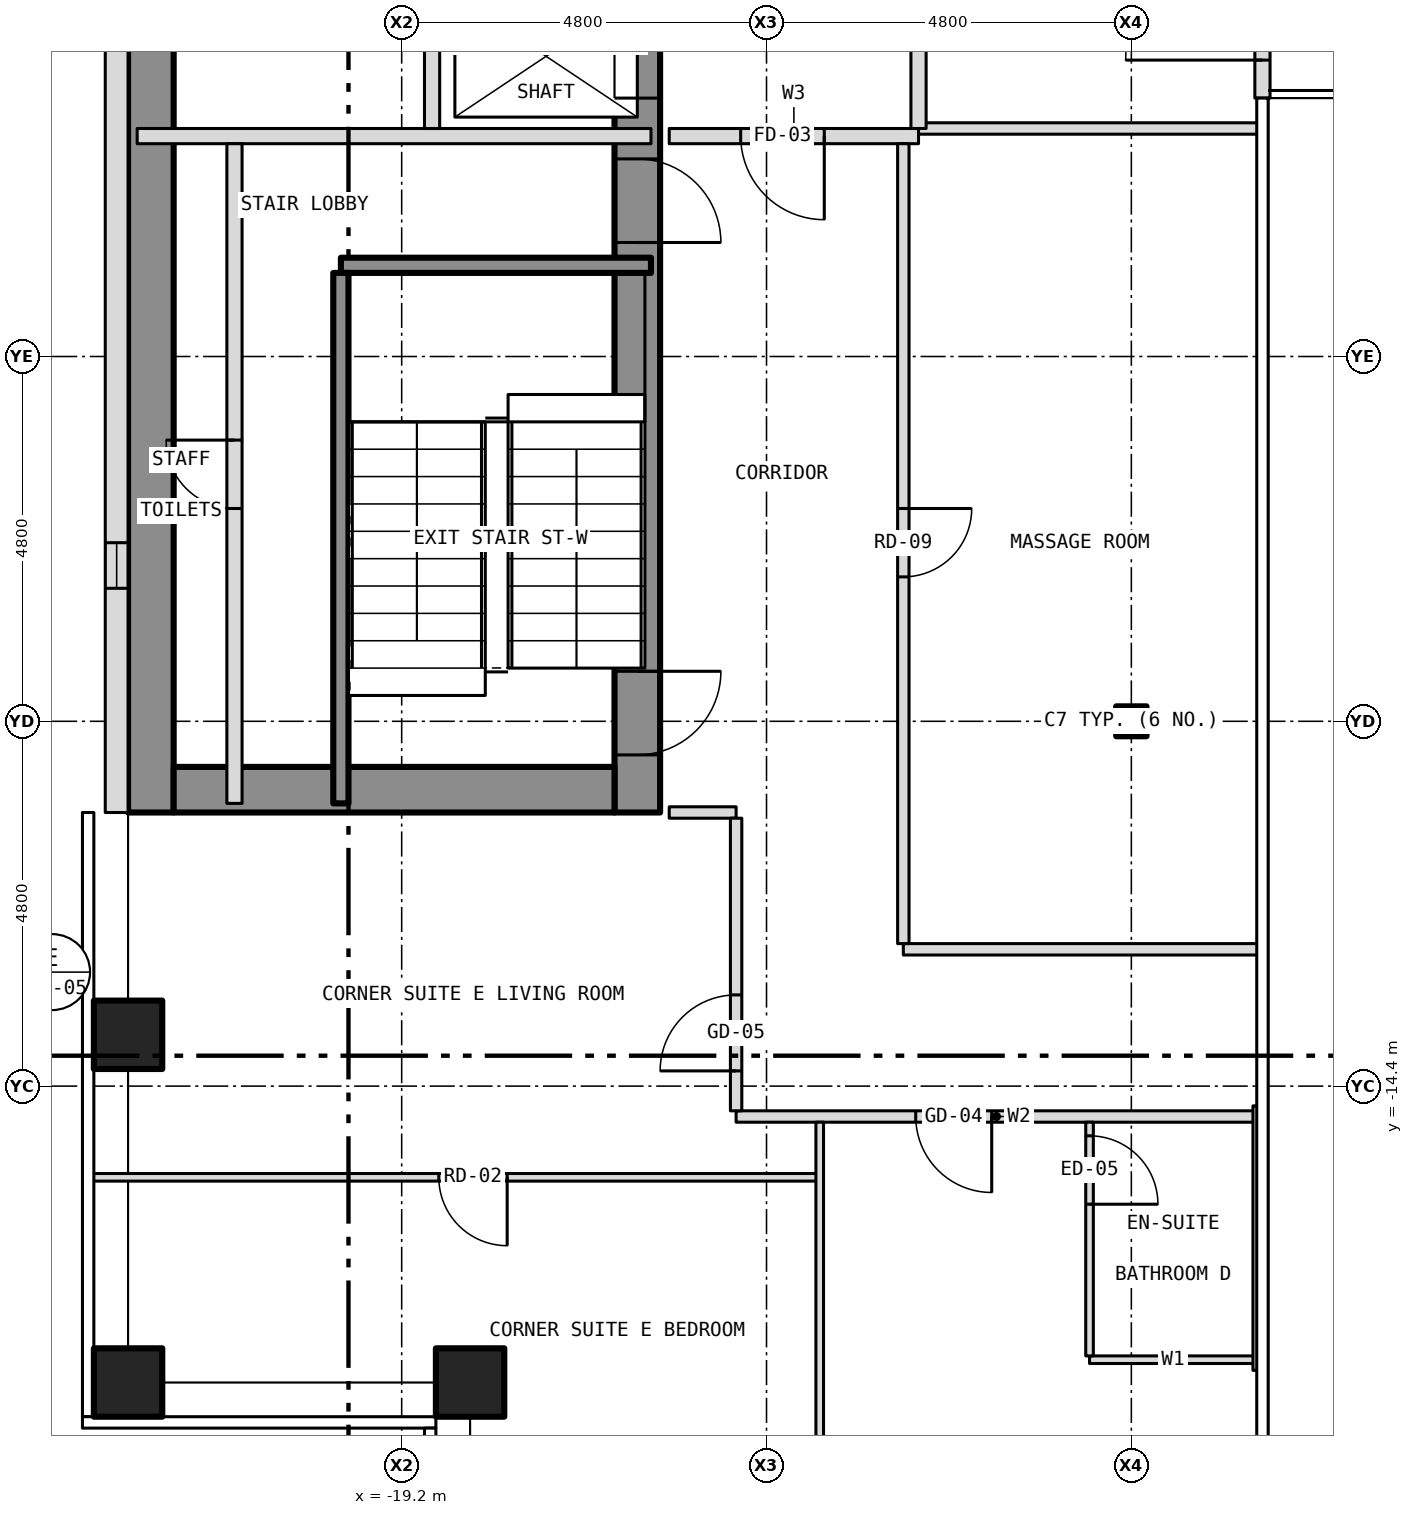
"""IFC4 building model, lengths in metres.
Left out: names, types, materials, properties, quantities, classifications, styles, units other than length and angle.
Written with IfcOpenShell. Run it as: python <this file> out.ifc"""

import sys

from ifc_helpers import new_model, si_unit, direction, frame, frame_2d, origin, origin_2d, place, context, subcontext, project, spatial, rectangle, hollow_rectangle, i_section, extrude, element, fill, save


model = new_model("IFC4")
c1 = context("Model", 3, precision=1e-05, world=origin(), true_north=direction((0.0, 1.0)))
c2 = subcontext(c1, "Body", "Model", "MODEL_VIEW")
j1 = project(units=[si_unit("LENGTHUNIT", "METRE"), si_unit("PLANEANGLEUNIT", "RADIAN")], contexts=[c1])
p1 = place(None, origin())
s1 = spatial("IfcSite", under=j1, at=p1, CompositionType="ELEMENT")
p2 = place(p1, origin())
s2 = spatial("IfcBuilding", under=s1, at=p2, CompositionType="ELEMENT")
p3 = place(p2, frame((0.0, 0.0, 127.5)))
s3 = spatial("IfcBuildingStorey", under=s2, at=p3, CompositionType="ELEMENT", Elevation=127.5)
for number, where, z_axis, x_axis in (
    (1, (-22.8, -18.3, -0.15), (0.0, 0.0, 1.0), (1.0, 0.0, 0.0)),
    (2, (-22.8, -13.725, -0.15), (0.0, 0.0, 1.0), (1.0, 0.0, 0.0)),
    (3, (-18.3, -18.3, -0.15), (0.0, 0.0, 1.0), (1.0, 0.0, 0.0)),
):
    element("IfcColumn", number, at=place(p3, frame(where, z_axis=z_axis, x_axis=x_axis)), inside=s3, PredefinedType="COLUMN", context=c2, shape_type="SweptSolid", body=[
        extrude(hollow_rectangle(XDim=0.9, YDim=0.9, WallThickness=0.05, at=origin_2d()), origin(), (0.0, 0.0, 1.0), 3.5),
    ])
p4 = place(p3, frame((-9.6, -9.6, -0.15), z_axis=(0.0, 0.0, 1.0), x_axis=(1.0, 0.0, 0.0)))
e4 = element("IfcColumn", 4, at=p4, inside=s3, PredefinedType="COLUMN", context=c2, shape_type="SweptSolid", body=[
    extrude(i_section(OverallWidth=0.399, OverallDepth=0.394, WebThickness=0.023, FlangeThickness=0.037, at=origin_2d()), origin(), (0.0, 0.0, 1.0), 3.5),
])
p5 = place(p3, frame((-16.1, -10.8, 0.0), z_axis=(0.0, 0.0, 1.0), x_axis=(0.0, 1.0, 0.0)))
e5 = element("IfcWall", 5, at=p5, inside=s3, PredefinedType="SHEAR", context=c2, shape_type="SweptSolid", body=[
    extrude(rectangle(XDim=21.6, YDim=0.6, at=frame_2d((10.8, 0.0))), origin(), (0.0, 0.0, 1.0), 3.25),
])
p6 = place(p5, frame((9.4, 0.0, 0.0)))
e6 = element("IfcOpeningElement", 6, at=p6, cuts=e5, PredefinedType="OPENING", context=c2, shape_type="SweptSolid", body=[
    extrude(rectangle(XDim=1.1, YDim=2.1, at=frame_2d((0.55, 1.05))), frame((0.0, 0.312, 0.0), z_axis=(0.0, -1.0, 0.0), x_axis=(1.0, 0.0, 0.0)), (0.0, 0.0, 1.0), 0.624),
])
p7 = place(p5, frame((11.5, 0.0, 0.0)))
e7 = element("IfcOpeningElement", 7, at=p7, cuts=e5, PredefinedType="OPENING", context=c2, shape_type="SweptSolid", body=[
    extrude(rectangle(XDim=1.1, YDim=2.1, at=frame_2d((0.55, 1.05))), frame((0.0, 0.312, 0.0), z_axis=(0.0, -1.0, 0.0), x_axis=(1.0, 0.0, 0.0)), (0.0, 0.0, 1.0), 0.624),
])
p8 = place(p5, frame((13.6, 0.0, 0.0)))
e8 = element("IfcOpeningElement", 8, at=p8, cuts=e5, PredefinedType="OPENING", context=c2, shape_type="SweptSolid", body=[
    extrude(rectangle(XDim=1.1, YDim=2.1, at=frame_2d((0.55, 1.05))), frame((0.0, 0.312, 0.0), z_axis=(0.0, -1.0, 0.0), x_axis=(1.0, 0.0, 0.0)), (0.0, 0.0, 1.0), 0.624),
])
p9 = place(p5, frame((15.7, 0.0, 0.0)))
e9 = element("IfcOpeningElement", 9, at=p9, cuts=e5, PredefinedType="OPENING", context=c2, shape_type="SweptSolid", body=[
    extrude(rectangle(XDim=1.1, YDim=2.1, at=frame_2d((0.55, 1.05))), frame((0.0, 0.312, 0.0), z_axis=(0.0, -1.0, 0.0), x_axis=(1.0, 0.0, 0.0)), (0.0, 0.0, 1.0), 0.624),
])
p10 = place(p5, frame((17.8, 0.0, 0.0)))
e10 = element("IfcOpeningElement", 10, at=p10, cuts=e5, PredefinedType="OPENING", context=c2, shape_type="SweptSolid", body=[
    extrude(rectangle(XDim=1.1, YDim=2.1, at=frame_2d((0.55, 1.05))), frame((0.0, 0.312, 0.0), z_axis=(0.0, -1.0, 0.0), x_axis=(1.0, 0.0, 0.0)), (0.0, 0.0, 1.0), 0.624),
])
p11 = place(p5, frame((0.758, 0.0, 0.0)))
e11 = element("IfcOpeningElement", 11, at=p11, cuts=e5, PredefinedType="OPENING", context=c2, shape_type="SweptSolid", body=[
    extrude(rectangle(XDim=1.1, YDim=2.1, at=frame_2d((0.55, 1.05))), frame((0.0, 0.312, 0.0), z_axis=(0.0, -1.0, 0.0), x_axis=(1.0, 0.0, 0.0)), (0.0, 0.0, 1.0), 0.624),
])
p12 = place(p5, frame((7.5, 0.0, 0.0)))
e12 = element("IfcOpeningElement", 12, at=p12, cuts=e5, PredefinedType="OPENING", context=c2, shape_type="SweptSolid", body=[
    extrude(rectangle(XDim=1.1, YDim=2.1, at=frame_2d((0.55, 1.05))), frame((0.0, 0.312, 0.0), z_axis=(0.0, -1.0, 0.0), x_axis=(1.0, 0.0, 0.0)), (0.0, 0.0, 1.0), 0.624),
])
p13 = place(p3, frame((-22.5, -10.8, 0.0), z_axis=(0.0, 0.0, 1.0), x_axis=(0.0, 1.0, 0.0)))
e13 = element("IfcWall", 13, at=p13, inside=s3, PredefinedType="SHEAR", context=c2, shape_type="SweptSolid", body=[
    extrude(rectangle(XDim=21.6, YDim=0.6, at=frame_2d((10.8, 0.0))), origin(), (0.0, 0.0, 1.0), 3.25),
])
p14 = place(p3, frame((-22.2, -10.5, 0.0), z_axis=(0.0, 0.0, 1.0), x_axis=(1.0, 0.0, 0.0)))
e14 = element("IfcWall", 14, at=p14, inside=s3, PredefinedType="SHEAR", context=c2, shape_type="SweptSolid", body=[
    extrude(rectangle(XDim=5.8, YDim=0.6, at=frame_2d((2.9, 0.0))), origin(), (0.0, 0.0, 1.0), 3.25),
])
p15 = place(p3, frame((-22.95, 10.8, 0.0), z_axis=(0.0, 0.0, 1.0), x_axis=(0.0, -1.0, 0.0)))
e15 = element("IfcWall", 15, at=p15, inside=s3, PredefinedType="SOLIDWALL", context=c2, shape_type="SweptSolid", body=[
    extrude(rectangle(XDim=21.6, YDim=0.3, at=frame_2d((10.8, 0.0))), origin(), (0.0, 0.0, 1.0), 3.5),
])
p16 = place(p15, frame((18.05, 0.0, 1.0)))
e16 = element("IfcOpeningElement", 16, at=p16, cuts=e15, PredefinedType="OPENING", context=c2, shape_type="SweptSolid", body=[
    extrude(rectangle(XDim=0.6, YDim=1.5, at=frame_2d((0.3, 0.75))), frame((0.0, 0.162, 0.0), z_axis=(0.0, -1.0, 0.0), x_axis=(1.0, 0.0, 0.0)), (0.0, 0.0, 1.0), 0.324),
])
p17 = place(p3, frame((-7.875, -1.4, 0.0), z_axis=(0.0, 0.0, 1.0), x_axis=(0.0, 1.0, 0.0)))
e17 = element("IfcWall", 17, at=p17, inside=s3, PredefinedType="SOLIDWALL", context=c2, shape_type="SweptSolid", body=[
    extrude(rectangle(XDim=2.8, YDim=0.2, at=frame_2d((1.4, 0.0))), origin(), (0.0, 0.0, 1.0), 3.5),
])
p18 = place(p17, frame((0.5, 0.0, 0.0)))
e18 = element("IfcOpeningElement", 18, at=p18, cuts=e17, PredefinedType="OPENING", context=c2, shape_type="SweptSolid", body=[
    extrude(rectangle(XDim=1.8, YDim=2.1, at=frame_2d((0.9, 1.05))), frame((0.0, 0.112, 0.0), z_axis=(0.0, -1.0, 0.0), x_axis=(1.0, 0.0, 0.0)), (0.0, 0.0, 1.0), 0.224),
])
p19 = place(p3, frame((-10.15, -18.0, 0.0), z_axis=(0.0, 0.0, 1.0), x_axis=(1.0, 0.0, 0.0)))
e19 = element("IfcWall", 19, at=p19, inside=s3, PredefinedType="PARTITIONING", context=c2, shape_type="SweptSolid", body=[
    extrude(rectangle(XDim=2.2, YDim=0.1, at=frame_2d((1.1, 0.0))), origin(), (0.0, 0.0, 1.0), 3.35),
])
p20 = place(p3, frame((-23.28, -15.6, 0.0), z_axis=(0.0, 0.0, 1.0), x_axis=(1.0, 0.0, 0.0)))
e20 = element("IfcWall", 20, at=p20, inside=s3, PredefinedType="PARTITIONING", context=c2, shape_type="SweptSolid", body=[
    extrude(rectangle(XDim=9.58, YDim=0.1, at=frame_2d((4.79, 0.0))), origin(), (0.0, 0.0, 1.0), 3.35),
])
p21 = place(p20, frame((4.568, 0.0, 0.0)))
e21 = element("IfcOpeningElement", 21, at=p21, cuts=e20, PredefinedType="OPENING", context=c2, shape_type="SweptSolid", body=[
    extrude(rectangle(XDim=0.9, YDim=2.1, at=frame_2d((0.45, 1.05))), frame((0.0, 0.062, 0.0), z_axis=(0.0, -1.0, 0.0), x_axis=(1.0, 0.0, 0.0)), (0.0, 0.0, 1.0), 0.124),
])
p22 = place(p3, frame((-14.8, -14.8, 0.0), z_axis=(0.0, 0.0, 1.0), x_axis=(1.0, 0.0, 0.0)))
e22 = element("IfcWall", 22, at=p22, inside=s3, PredefinedType="PARTITIONING", context=c2, shape_type="SweptSolid", body=[
    extrude(rectangle(XDim=6.85, YDim=0.15, at=frame_2d((3.425, 0.0))), origin(), (0.0, 0.0, 1.0), 3.35),
])
p23 = place(p22, frame((2.363, 0.0, 0.0)))
e23 = element("IfcOpeningElement", 23, at=p23, cuts=e22, PredefinedType="OPENING", context=c2, shape_type="SweptSolid", body=[
    extrude(rectangle(XDim=1.0, YDim=2.1, at=frame_2d((0.5, 1.05))), frame((0.0, 0.087, 0.0), z_axis=(0.0, -1.0, 0.0), x_axis=(1.0, 0.0, 0.0)), (0.0, 0.0, 1.0), 0.174),
])
p24 = place(p3, frame((-12.6, -12.6, 0.0), z_axis=(0.0, 0.0, 1.0), x_axis=(1.0, 0.0, 0.0)))
e24 = element("IfcWall", 24, at=p24, inside=s3, PredefinedType="PARTITIONING", context=c2, shape_type="SweptSolid", body=[
    extrude(rectangle(XDim=4.68, YDim=0.15, at=frame_2d((2.34, 0.0))), origin(), (0.0, 0.0, 1.0), 3.35),
])
p25 = place(p3, frame((-15.68, -10.8, 0.0), z_axis=(0.0, 0.0, 1.0), x_axis=(1.0, 0.0, 0.0)))
e25 = element("IfcWall", 25, at=p25, inside=s3, PredefinedType="PARTITIONING", context=c2, shape_type="SweptSolid", body=[
    extrude(rectangle(XDim=0.88, YDim=0.15, at=frame_2d((0.44, 0.0))), origin(), (0.0, 0.0, 1.0), 3.35),
])
p26 = place(p3, frame((-20.0, -3.6, 0.0), z_axis=(0.0, 0.0, 1.0), x_axis=(1.0, 0.0, 0.0)))
e26 = element("IfcWall", 26, at=p26, inside=s3, PredefinedType="SHEAR", context=c2, shape_type="SweptSolid", body=[
    extrude(rectangle(XDim=4.08, YDim=0.2, at=frame_2d((2.04, 0.0))), origin(), (0.0, 0.0, 1.0), 3.25),
])
p27 = place(p3, frame((-22.68, -1.9, 0.0), z_axis=(0.0, 0.0, 1.0), x_axis=(1.0, 0.0, 0.0)))
e27 = element("IfcWall", 27, at=p27, inside=s3, PredefinedType="PARTITIONING", context=c2, shape_type="SweptSolid", body=[
    extrude(rectangle(XDim=6.76, YDim=0.2, at=frame_2d((3.38, 0.0))), origin(), (0.0, 0.0, 1.0), 3.25),
])
p28 = place(p3, frame((-15.68, -1.9, 0.0), z_axis=(0.0, 0.0, 1.0), x_axis=(1.0, 0.0, 0.0)))
e28 = element("IfcWall", 28, at=p28, inside=s3, PredefinedType="PARTITIONING", context=c2, shape_type="SweptSolid", body=[
    extrude(rectangle(XDim=3.28, YDim=0.2, at=frame_2d((1.64, 0.0))), origin(), (0.0, 0.0, 1.0), 3.35),
])
p29 = place(p28, frame((0.94, 0.0, 0.0)))
e29 = element("IfcOpeningElement", 29, at=p29, cuts=e28, PredefinedType="OPENING", context=c2, shape_type="SweptSolid", body=[
    extrude(rectangle(XDim=1.1, YDim=2.1, at=frame_2d((0.55, 1.05))), frame((0.0, 0.112, 0.0), z_axis=(0.0, -1.0, 0.0), x_axis=(1.0, 0.0, 0.0)), (0.0, 0.0, 1.0), 0.224),
])
p30 = place(p3, frame((-12.4, -1.8, 0.0), z_axis=(0.0, 0.0, 1.0), x_axis=(1.0, 0.0, 0.0)))
e30 = element("IfcWall", 30, at=p30, inside=s3, PredefinedType="PARTITIONING", context=c2, shape_type="SweptSolid", body=[
    extrude(rectangle(XDim=4.48, YDim=0.15, at=frame_2d((2.24, 0.0))), origin(), (0.0, 0.0, 1.0), 3.35),
])
p31 = place(p3, frame((-21.4, -10.68, 0.0), z_axis=(0.0, 0.0, 1.0), x_axis=(0.0, 1.0, 0.0)))
e31 = element("IfcWall", 31, at=p31, inside=s3, PredefinedType="PARTITIONING", context=c2, shape_type="SweptSolid", body=[
    extrude(rectangle(XDim=8.68, YDim=0.2, at=frame_2d((4.34, 0.0))), origin(), (0.0, 0.0, 1.0), 3.25),
])
p32 = place(p31, frame((3.88, 0.0, 0.0)))
e32 = element("IfcOpeningElement", 32, at=p32, cuts=e31, PredefinedType="OPENING", context=c2, shape_type="SweptSolid", body=[
    extrude(rectangle(XDim=0.9, YDim=2.1, at=frame_2d((0.45, 1.05))), frame((0.0, 0.112, 0.0), z_axis=(0.0, -1.0, 0.0), x_axis=(1.0, 0.0, 0.0)), (0.0, 0.0, 1.0), 0.224),
])
p33 = place(p3, frame((-20.0, -10.68, 0.0), z_axis=(0.0, 0.0, 1.0), x_axis=(0.0, 1.0, 0.0)))
e33 = element("IfcWall", 33, at=p33, inside=s3, PredefinedType="SHEAR", context=c2, shape_type="SweptSolid", body=[
    extrude(rectangle(XDim=6.98, YDim=0.2, at=frame_2d((3.49, 0.0))), origin(), (0.0, 0.0, 1.0), 3.25),
])
p34 = place(p3, frame((-18.8, -1.8, 0.0), z_axis=(0.0, 0.0, 1.0), x_axis=(0.0, 1.0, 0.0)))
e34 = element("IfcWall", 34, at=p34, inside=s3, PredefinedType="PARTITIONING", context=c2, shape_type="SweptSolid", body=[
    extrude(rectangle(XDim=12.48, YDim=0.2, at=frame_2d((6.24, 0.0))), origin(), (0.0, 0.0, 1.0), 3.25),
])
p35 = place(p3, frame((-14.8, -14.725, 0.0), z_axis=(0.0, 0.0, 1.0), x_axis=(0.0, 1.0, 0.0)))
e35 = element("IfcWall", 35, at=p35, inside=s3, PredefinedType="PARTITIONING", context=c2, shape_type="SweptSolid", body=[
    extrude(rectangle(XDim=3.85, YDim=0.15, at=frame_2d((1.925, 0.0))), origin(), (0.0, 0.0, 1.0), 3.35),
])
p36 = place(p35, frame((0.525, 0.0, 0.0)))
e36 = element("IfcOpeningElement", 36, at=p36, cuts=e35, PredefinedType="OPENING", context=c2, shape_type="SweptSolid", body=[
    extrude(rectangle(XDim=1.0, YDim=2.1, at=frame_2d((0.5, 1.05))), frame((0.0, 0.087, 0.0), z_axis=(0.0, -1.0, 0.0), x_axis=(1.0, 0.0, 0.0)), (0.0, 0.0, 1.0), 0.174),
])
p37 = place(p3, frame((-13.7, -22.68, 0.0), z_axis=(0.0, 0.0, 1.0), x_axis=(0.0, 1.0, 0.0)))
e37 = element("IfcWall", 37, at=p37, inside=s3, PredefinedType="PARTITIONING", context=c2, shape_type="SweptSolid", body=[
    extrude(rectangle(XDim=7.805, YDim=0.1, at=frame_2d((3.902, 0.0))), origin(), (0.0, 0.0, 1.0), 3.35),
])
p38 = place(p3, frame((-12.6, -12.525, 0.0), z_axis=(0.0, 0.0, 1.0), x_axis=(0.0, 1.0, 0.0)))
e38 = element("IfcWall", 38, at=p38, inside=s3, PredefinedType="PARTITIONING", context=c2, shape_type="SweptSolid", body=[
    extrude(rectangle(XDim=10.525, YDim=0.15, at=frame_2d((5.262, 0.0))), origin(), (0.0, 0.0, 1.0), 3.35),
])
p39 = place(p38, frame((4.825, 0.0, 0.0)))
e39 = element("IfcOpeningElement", 39, at=p39, cuts=e38, PredefinedType="OPENING", context=c2, shape_type="SweptSolid", body=[
    extrude(rectangle(XDim=0.9, YDim=2.1, at=frame_2d((0.45, 1.05))), frame((0.0, 0.087, 0.0), z_axis=(0.0, -1.0, 0.0), x_axis=(1.0, 0.0, 0.0)), (0.0, 0.0, 1.0), 0.174),
])
p40 = place(p3, frame((-12.4, -1.8, 0.0), z_axis=(0.0, 0.0, 1.0), x_axis=(0.0, 1.0, 0.0)))
e40 = element("IfcWall", 40, at=p40, inside=s3, PredefinedType="PARTITIONING", context=c2, shape_type="SweptSolid", body=[
    extrude(rectangle(XDim=4.0, YDim=0.2, at=frame_2d((2.0, 0.0))), origin(), (0.0, 0.0, 1.0), 3.35),
])
p41 = place(p40, frame((1.25, 0.0, 0.0)))
e41 = element("IfcOpeningElement", 41, at=p41, cuts=e40, PredefinedType="OPENING", context=c2, shape_type="SweptSolid", body=[
    extrude(rectangle(XDim=1.1, YDim=2.1, at=frame_2d((0.55, 1.05))), frame((0.0, 0.112, 0.0), z_axis=(0.0, -1.0, 0.0), x_axis=(1.0, 0.0, 0.0)), (0.0, 0.0, 1.0), 0.224),
])
p42 = place(p3, frame((-10.15, -17.95, 0.0), z_axis=(0.0, 0.0, 1.0), x_axis=(0.0, 1.0, 0.0)))
e42 = element("IfcWall", 42, at=p42, inside=s3, PredefinedType="PARTITIONING", context=c2, shape_type="SweptSolid", body=[
    extrude(rectangle(XDim=3.075, YDim=0.1, at=frame_2d((1.538, 0.0))), origin(), (0.0, 0.0, 1.0), 3.35),
])
p43 = place(p42, frame((1.996, 0.0, 0.0)))
e43 = element("IfcOpeningElement", 43, at=p43, cuts=e42, PredefinedType="OPENING", context=c2, shape_type="SweptSolid", body=[
    extrude(rectangle(XDim=0.9, YDim=2.1, at=frame_2d((0.45, 1.05))), frame((0.0, 0.062, 0.0), z_axis=(0.0, -1.0, 0.0), x_axis=(1.0, 0.0, 0.0)), (0.0, 0.0, 1.0), 0.124),
])
p44 = place(p3, frame((-7.95, -18.14, 0.0), z_axis=(0.0, 0.0, 1.0), x_axis=(0.0, 1.0, 0.0)))
e44 = element("IfcWall", 44, at=p44, inside=s3, PredefinedType="PARTITIONING", context=c2, shape_type="SweptSolid", body=[
    extrude(rectangle(XDim=3.48, YDim=0.1, at=frame_2d((1.74, 0.0))), origin(), (0.0, 0.0, 1.0), 2.733),
])
p45 = place(p16, origin())
e45 = element("IfcWindow", 45, at=p45, inside=s3, PartitioningType="SINGLE_PANEL", PredefinedType="WINDOW", context=c2, shape_type="SweptSolid", body=[
    extrude(rectangle(XDim=0.6, YDim=1.5, at=frame_2d((0.3, 0.75))), frame((0.0, -0.06, 0.0), z_axis=(0.0, -1.0, 0.0), x_axis=(1.0, 0.0, 0.0)), (0.0, 0.0, 1.0), 0.06),
])
fill(e16, e45)
p46 = place(p18, origin())
e46 = element("IfcDoor", 46, at=p46, inside=s3, OperationType="DOUBLE_DOOR_DOUBLE_SWING", PredefinedType="DOOR", context=c2, shape_type="SweptSolid", body=[
    extrude(rectangle(XDim=1.8, YDim=2.1, at=frame_2d((0.9, 1.05))), frame((0.0, 0.025, 0.0), z_axis=(0.0, -1.0, 0.0), x_axis=(1.0, 0.0, 0.0)), (0.0, 0.0, 1.0), 0.05),
])
fill(e18, e46)
p47 = place(p6, origin())
e47 = element("IfcDoor", 47, at=p47, inside=s3, OperationType="SLIDING_TO_LEFT", PredefinedType="DOOR", context=c2, shape_type="SweptSolid", body=[
    extrude(rectangle(XDim=1.1, YDim=2.1, at=frame_2d((0.55, 1.05))), frame((0.0, 0.025, 0.0), z_axis=(0.0, -1.0, 0.0), x_axis=(1.0, 0.0, 0.0)), (0.0, 0.0, 1.0), 0.05),
])
fill(e6, e47)
p48 = place(p11, origin())
e48 = element("IfcDoor", 48, at=p48, inside=s3, OperationType="SINGLE_SWING_RIGHT", PredefinedType="DOOR", context=c2, shape_type="SweptSolid", body=[
    extrude(rectangle(XDim=1.1, YDim=2.1, at=frame_2d((0.55, 1.05))), frame((0.0, 0.025, 0.0), z_axis=(0.0, -1.0, 0.0), x_axis=(1.0, 0.0, 0.0)), (0.0, 0.0, 1.0), 0.05),
])
fill(e11, e48)
p49 = place(p12, origin())
e49 = element("IfcDoor", 49, at=p49, inside=s3, OperationType="SINGLE_SWING_LEFT", PredefinedType="DOOR", context=c2, shape_type="SweptSolid", body=[
    extrude(rectangle(XDim=1.1, YDim=2.1, at=frame_2d((0.55, 1.05))), frame((0.0, 0.025, 0.0), z_axis=(0.0, -1.0, 0.0), x_axis=(1.0, 0.0, 0.0)), (0.0, 0.0, 1.0), 0.05),
])
fill(e12, e49)
p50 = place(p32, origin())
e50 = element("IfcDoor", 50, at=p50, inside=s3, OperationType="SINGLE_SWING_RIGHT", PredefinedType="DOOR", context=c2, shape_type="SweptSolid", body=[
    extrude(rectangle(XDim=0.9, YDim=2.1, at=frame_2d((0.45, 1.05))), frame((0.0, 0.025, 0.0), z_axis=(0.0, -1.0, 0.0), x_axis=(1.0, 0.0, 0.0)), (0.0, 0.0, 1.0), 0.05),
])
fill(e32, e50)
p51 = place(p29, origin())
e51 = element("IfcDoor", 51, at=p51, inside=s3, OperationType="SINGLE_SWING_RIGHT", PredefinedType="DOOR", context=c2, shape_type="SweptSolid", body=[
    extrude(rectangle(XDim=1.1, YDim=2.1, at=frame_2d((0.55, 1.05))), frame((0.0, 0.025, 0.0), z_axis=(0.0, -1.0, 0.0), x_axis=(1.0, 0.0, 0.0)), (0.0, 0.0, 1.0), 0.05),
])
fill(e29, e51)
p52 = place(p23, origin())
e52 = element("IfcDoor", 52, at=p52, inside=s3, OperationType="SINGLE_SWING_RIGHT", PredefinedType="DOOR", context=c2, shape_type="SweptSolid", body=[
    extrude(rectangle(XDim=1.0, YDim=2.1, at=frame_2d((0.5, 1.05))), frame((0.0, 0.025, 0.0), z_axis=(0.0, -1.0, 0.0), x_axis=(1.0, 0.0, 0.0)), (0.0, 0.0, 1.0), 0.05),
])
fill(e23, e52)
p53 = place(p43, origin())
e53 = element("IfcDoor", 53, at=p53, inside=s3, OperationType="SINGLE_SWING_LEFT", PredefinedType="DOOR", context=c2, shape_type="SweptSolid", body=[
    extrude(rectangle(XDim=0.9, YDim=2.1, at=frame_2d((0.45, 1.05))), frame((0.0, 0.025, 0.0), z_axis=(0.0, -1.0, 0.0), x_axis=(1.0, 0.0, 0.0)), (0.0, 0.0, 1.0), 0.05),
])
fill(e43, e53)
p54 = place(p36, origin())
e54 = element("IfcDoor", 54, at=p54, inside=s3, OperationType="SINGLE_SWING_LEFT", PredefinedType="DOOR", context=c2, shape_type="SweptSolid", body=[
    extrude(rectangle(XDim=1.0, YDim=2.1, at=frame_2d((0.5, 1.05))), frame((0.0, 0.025, 0.0), z_axis=(0.0, -1.0, 0.0), x_axis=(1.0, 0.0, 0.0)), (0.0, 0.0, 1.0), 0.05),
])
fill(e36, e54)
p55 = place(p21, origin())
e55 = element("IfcDoor", 55, at=p55, inside=s3, OperationType="SINGLE_SWING_RIGHT", PredefinedType="DOOR", context=c2, shape_type="SweptSolid", body=[
    extrude(rectangle(XDim=0.9, YDim=2.1, at=frame_2d((0.45, 1.05))), frame((0.0, 0.025, 0.0), z_axis=(0.0, -1.0, 0.0), x_axis=(1.0, 0.0, 0.0)), (0.0, 0.0, 1.0), 0.05),
])
fill(e21, e55)
p56 = place(p39, origin())
e56 = element("IfcDoor", 56, at=p56, inside=s3, OperationType="SINGLE_SWING_RIGHT", PredefinedType="DOOR", context=c2, shape_type="SweptSolid", body=[
    extrude(rectangle(XDim=0.9, YDim=2.1, at=frame_2d((0.45, 1.05))), frame((0.0, 0.025, 0.0), z_axis=(0.0, -1.0, 0.0), x_axis=(1.0, 0.0, 0.0)), (0.0, 0.0, 1.0), 0.05),
])
fill(e39, e56)
save(model, sys.argv[1])
